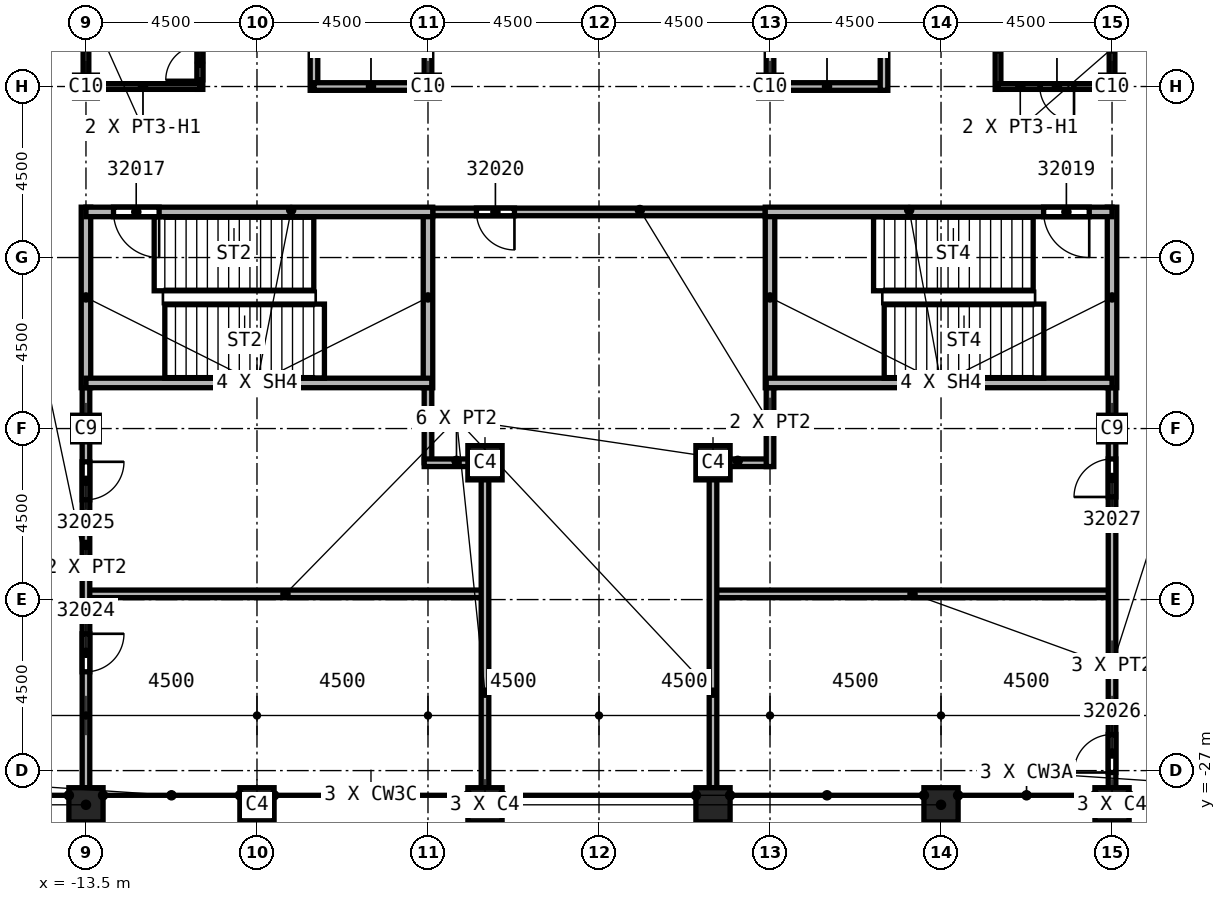
"""IFC4 building model, lengths in metres.
Left out: names, types, materials, properties, quantities, classifications, styles, units other than length and angle.
Written with IfcOpenShell. Run it as: python <this file> out.ifc"""

import sys

from ifc_helpers import new_model, si_unit, direction, frame, frame_2d, origin, origin_2d, place, context, subcontext, project, spatial, rectangle, extrude, element, fill, save


model = new_model("IFC4")
c1 = context("Model", 3, precision=1e-05, world=origin(), true_north=direction((0.0, 1.0)))
c2 = subcontext(c1, "Body", "Model", "MODEL_VIEW")
j1 = project(units=[si_unit("LENGTHUNIT", "METRE"), si_unit("PLANEANGLEUNIT", "RADIAN")], contexts=[c1])
p1 = place(None, origin())
s1 = spatial("IfcSite", under=j1, at=p1, CompositionType="ELEMENT")
p2 = place(p1, origin())
s2 = spatial("IfcBuilding", under=s1, at=p2, CompositionType="ELEMENT")
p3 = place(p2, frame((0.0, 0.0, 356.0)))
s3 = spatial("IfcBuildingStorey", under=s2, at=p3, CompositionType="ELEMENT", Elevation=356.0)
for number, where, z_axis, x_axis in (
    (1, (13.5, -18.0, 0.0), (0.0, 0.0, 1.0), (1.0, 0.0, 0.0)),
    (2, (-13.5, -18.0, 0.0), (0.0, 0.0, 1.0), (1.0, 0.0, 0.0)),
):
    element("IfcColumn", number, at=place(p3, frame(where, z_axis=z_axis, x_axis=x_axis)), inside=s3, PredefinedType="COLUMN", context=c2, shape_type="SweptSolid", body=[
        extrude(rectangle(XDim=0.7, YDim=0.7, at=origin_2d()), origin(), (0.0, 0.0, 1.0), 4.6),
    ])
for number, where, z_axis, x_axis in (
    (3, (4.5, -9.0, 0.0), (0.0, 0.0, 1.0), (1.0, 0.0, 0.0)),
    (4, (13.5, -9.0, 0.0), (0.0, 0.0, 1.0), (1.0, 0.0, 0.0)),
    (5, (-4.5, -9.0, 0.0), (0.0, 0.0, 1.0), (1.0, 0.0, 0.0)),
    (6, (-13.5, -9.0, 0.0), (0.0, 0.0, 1.0), (1.0, 0.0, 0.0)),
):
    element("IfcColumn", number, at=place(p3, frame(where, z_axis=z_axis, x_axis=x_axis)), inside=s3, PredefinedType="COLUMN", context=c2, shape_type="SweptSolid", body=[
        extrude(rectangle(XDim=0.6, YDim=0.6, at=origin_2d()), origin(), (0.0, 0.0, 1.0), 4.6),
    ])
for number, where, z_axis, x_axis in (
    (7, (3.0, -27.9, 0.0), (0.0, 0.0, 1.0), (1.0, 0.0, 0.0)),
    (8, (9.0, -27.9, 0.0), (0.0, 0.0, 1.0), (1.0, 0.0, 0.0)),
    (9, (13.5, -27.9, 0.0), (0.0, 0.0, 1.0), (1.0, 0.0, 0.0)),
    (10, (-3.0, -27.9, 0.0), (0.0, 0.0, 1.0), (1.0, 0.0, 0.0)),
    (11, (-9.0, -27.9, 0.0), (0.0, 0.0, 1.0), (1.0, 0.0, 0.0)),
    (12, (-13.5, -27.9, 0.0), (0.0, 0.0, 1.0), (1.0, 0.0, 0.0)),
    (13, (3.0, -18.9, 0.0), (0.0, 0.0, 1.0), (1.0, 0.0, 0.0)),
    (14, (-3.0, -18.9, 0.0), (0.0, 0.0, 1.0), (1.0, 0.0, 0.0)),
):
    element("IfcColumn", number, at=place(p3, frame(where, z_axis=z_axis, x_axis=x_axis)), inside=s3, PredefinedType="COLUMN", context=c2, shape_type="SweptSolid", body=[
        extrude(rectangle(XDim=0.9, YDim=0.9, at=origin_2d()), origin(), (0.0, 0.0, 1.0), 4.6),
    ])
p4 = place(p3, frame((-13.5, -22.35, 0.0), z_axis=(0.0, 0.0, 1.0), x_axis=(1.0, 0.0, 0.0)))
e15 = element("IfcWall", 15, at=p4, inside=s3, PredefinedType="PARTITIONING", context=c2, shape_type="SweptSolid", body=[
    extrude(rectangle(XDim=10.5, YDim=0.2, at=frame_2d((5.25, 0.0))), origin(), (0.0, 0.0, 1.0), 4.15),
])
p5 = place(p3, frame((-13.5, -16.675, 0.0), z_axis=(0.0, 0.0, 1.0), x_axis=(0.0, -1.0, 0.0)))
e16 = element("IfcWall", 16, at=p5, inside=s3, PredefinedType="PARTITIONING", context=c2, shape_type="SweptSolid", body=[
    extrude(rectangle(XDim=10.775, YDim=0.2, at=frame_2d((5.387, 0.0))), origin(), (0.0, 0.0, 1.0), 4.15),
])
p6 = place(p5, frame((6.725, 0.0, 0.0)))
e17 = element("IfcOpeningElement", 17, at=p6, cuts=e16, PredefinedType="OPENING", context=c2, shape_type="SweptSolid", body=[
    extrude(rectangle(XDim=1.0, YDim=2.1, at=frame_2d((0.5, 1.05))), frame((0.0, 0.1, 0.0), z_axis=(0.0, -1.0, 0.0), x_axis=(1.0, 0.0, 0.0)), (0.0, 0.0, 1.0), 0.2),
])
p7 = place(p5, frame((2.2, 0.0, 0.0)))
e18 = element("IfcOpeningElement", 18, at=p7, cuts=e16, PredefinedType="OPENING", context=c2, shape_type="SweptSolid", body=[
    extrude(rectangle(XDim=1.0, YDim=2.1, at=frame_2d((0.5, 1.05))), frame((0.0, 0.1, 0.0), z_axis=(0.0, -1.0, 0.0), x_axis=(1.0, 0.0, 0.0)), (0.0, 0.0, 1.0), 0.2),
])
p8 = place(p3, frame((-4.5, -18.9, 0.0), z_axis=(0.0, 0.0, 1.0), x_axis=(0.0, 1.0, 0.0)))
e19 = element("IfcWall", 19, at=p8, inside=s3, PredefinedType="PARTITIONING", context=c2, shape_type="SweptSolid", body=[
    extrude(rectangle(XDim=2.1, YDim=0.2, at=frame_2d((1.05, 0.0))), origin(), (0.0, 0.0, 1.0), 4.15),
])
p9 = place(p3, frame((-3.0, -27.45, 0.0), z_axis=(0.0, 0.0, 1.0), x_axis=(0.0, 1.0, 0.0)))
e20 = element("IfcWall", 20, at=p9, inside=s3, PredefinedType="PARTITIONING", context=c2, shape_type="SweptSolid", body=[
    extrude(rectangle(XDim=8.65, YDim=0.2, at=frame_2d((4.325, 0.0))), origin(), (0.0, 0.0, 1.0), 4.15),
])
p10 = place(p3, frame((-3.0, -18.9, 0.0), z_axis=(0.0, 0.0, 1.0), x_axis=(-1.0, 0.0, 0.0)))
e21 = element("IfcWall", 21, at=p10, inside=s3, PredefinedType="PARTITIONING", context=c2, shape_type="SweptSolid", body=[
    extrude(rectangle(XDim=1.6, YDim=0.2, at=frame_2d((0.8, 0.0))), origin(), (0.0, 0.0, 1.0), 4.15),
])
p11 = place(p3, frame((3.0, -22.35, 0.0), z_axis=(0.0, 0.0, 1.0), x_axis=(1.0, 0.0, 0.0)))
e22 = element("IfcWall", 22, at=p11, inside=s3, PredefinedType="PARTITIONING", context=c2, shape_type="SweptSolid", body=[
    extrude(rectangle(XDim=10.5, YDim=0.2, at=frame_2d((5.25, 0.0))), origin(), (0.0, 0.0, 1.0), 4.15),
])
p12 = place(p3, frame((3.0, -18.9, 0.0), z_axis=(0.0, 0.0, 1.0), x_axis=(0.0, -1.0, 0.0)))
e23 = element("IfcWall", 23, at=p12, inside=s3, PredefinedType="PARTITIONING", context=c2, shape_type="SweptSolid", body=[
    extrude(rectangle(XDim=8.55, YDim=0.2, at=frame_2d((4.275, 0.0))), origin(), (0.0, 0.0, 1.0), 4.15),
])
p13 = place(p3, frame((4.5, -18.9, 0.0), z_axis=(0.0, 0.0, 1.0), x_axis=(-1.0, 0.0, 0.0)))
e24 = element("IfcWall", 24, at=p13, inside=s3, PredefinedType="PARTITIONING", context=c2, shape_type="SweptSolid", body=[
    extrude(rectangle(XDim=1.6, YDim=0.2, at=frame_2d((0.8, 0.0))), origin(), (0.0, 0.0, 1.0), 4.15),
])
p14 = place(p3, frame((4.5, -16.8, 0.0), z_axis=(0.0, 0.0, 1.0), x_axis=(0.0, -1.0, 0.0)))
e25 = element("IfcWall", 25, at=p14, inside=s3, PredefinedType="PARTITIONING", context=c2, shape_type="SweptSolid", body=[
    extrude(rectangle(XDim=2.2, YDim=0.2, at=frame_2d((1.1, 0.0))), origin(), (0.0, 0.0, 1.0), 4.15),
])
p15 = place(p3, frame((4.625, -12.3, 0.0), z_axis=(0.0, 0.0, 1.0), x_axis=(-1.0, 0.0, 0.0)))
e26 = element("IfcWall", 26, at=p15, inside=s3, PredefinedType="PARTITIONING", context=c2, shape_type="SweptSolid", body=[
    extrude(rectangle(XDim=9.25, YDim=0.2, at=frame_2d((4.625, 0.0))), origin(), (0.0, 0.0, 1.0), 4.15),
])
p16 = place(p15, frame((6.85, 0.0, 0.0)))
e27 = element("IfcOpeningElement", 27, at=p16, cuts=e26, PredefinedType="OPENING", context=c2, shape_type="SweptSolid", body=[
    extrude(rectangle(XDim=1.0, YDim=2.1, at=frame_2d((0.5, 1.05))), frame((0.0, 0.1, 0.0), z_axis=(0.0, -1.0, 0.0), x_axis=(1.0, 0.0, 0.0)), (0.0, 0.0, 1.0), 0.2),
])
p17 = place(p3, frame((13.5, -27.45, 0.0), z_axis=(0.0, 0.0, 1.0), x_axis=(0.0, 1.0, 0.0)))
e28 = element("IfcWall", 28, at=p17, inside=s3, PredefinedType="PARTITIONING", context=c2, shape_type="SweptSolid", body=[
    extrude(rectangle(XDim=10.775, YDim=0.2, at=frame_2d((5.387, 0.0))), origin(), (0.0, 0.0, 1.0), 4.15),
])
p18 = place(p17, frame((0.4, 0.0, 0.0)))
e29 = element("IfcOpeningElement", 29, at=p18, cuts=e28, PredefinedType="OPENING", context=c2, shape_type="SweptSolid", body=[
    extrude(rectangle(XDim=1.0, YDim=2.1, at=frame_2d((0.5, 1.05))), frame((0.0, 0.1, 0.0), z_axis=(0.0, -1.0, 0.0), x_axis=(1.0, 0.0, 0.0)), (0.0, 0.0, 1.0), 0.2),
])
p19 = place(p17, frame((7.65, 0.0, 0.0)))
e30 = element("IfcOpeningElement", 30, at=p19, cuts=e28, PredefinedType="OPENING", context=c2, shape_type="SweptSolid", body=[
    extrude(rectangle(XDim=1.0, YDim=2.1, at=frame_2d((0.5, 1.05))), frame((0.0, 0.1, 0.0), z_axis=(0.0, -1.0, 0.0), x_axis=(1.0, 0.0, 0.0)), (0.0, 0.0, 1.0), 0.2),
])
p20 = place(p3, frame((-7.5, -9.1, 0.0), z_axis=(0.0, 0.0, 1.0), x_axis=(0.0, 1.0, 0.0)))
e31 = element("IfcWall", 31, at=p20, inside=s3, PredefinedType="SOLIDWALL", context=c2, shape_type="SweptSolid", body=[
    extrude(rectangle(XDim=6.225, YDim=0.2, at=frame_2d((3.113, 0.0))), origin(), (0.0, 0.0, 1.0), 4.15),
])
p21 = place(p3, frame((-4.5, -9.0, 0.0), z_axis=(0.0, 0.0, 1.0), x_axis=(-1.0, 0.0, 0.0)))
e32 = element("IfcWall", 32, at=p21, inside=s3, PredefinedType="SOLIDWALL", context=c2, shape_type="SweptSolid", body=[
    extrude(rectangle(XDim=3.0, YDim=0.2, at=frame_2d((1.5, 0.0))), origin(), (0.0, 0.0, 1.0), 3.838),
])
p22 = place(p3, frame((-4.5, 9.1, 0.0), z_axis=(0.0, 0.0, 1.0), x_axis=(0.0, -1.0, 0.0)))
e33 = element("IfcWall", 33, at=p22, inside=s3, PredefinedType="SOLIDWALL", context=c2, shape_type="SweptSolid", body=[
    extrude(rectangle(XDim=18.2, YDim=0.2, at=frame_2d((9.1, 0.0))), origin(), (0.0, 0.0, 1.0), 3.838),
])
p23 = place(p22, frame((12.35, 0.0, 0.0)))
e34 = element("IfcOpeningElement", 34, at=p23, cuts=e33, PredefinedType="OPENING", context=c2, shape_type="SweptSolid", body=[
    extrude(rectangle(XDim=1.1, YDim=2.1, at=frame_2d((0.55, 1.05))), frame((0.0, 0.1, 0.0), z_axis=(0.0, -1.0, 0.0), x_axis=(1.0, 0.0, 0.0)), (0.0, 0.0, 1.0), 0.2),
])
p24 = place(p22, frame((7.15, 0.0, 0.0)))
e35 = element("IfcOpeningElement", 35, at=p24, cuts=e33, PredefinedType="OPENING", context=c2, shape_type="SweptSolid", body=[
    extrude(rectangle(XDim=1.1, YDim=2.1, at=frame_2d((0.55, 1.05))), frame((0.0, 0.1, 0.0), z_axis=(0.0, -1.0, 0.0), x_axis=(1.0, 0.0, 0.0)), (0.0, 0.0, 1.0), 0.2),
])
p25 = place(p3, frame((4.5, -9.1, 0.0), z_axis=(0.0, 0.0, 1.0), x_axis=(0.0, 1.0, 0.0)))
e36 = element("IfcWall", 36, at=p25, inside=s3, PredefinedType="SOLIDWALL", context=c2, shape_type="SweptSolid", body=[
    extrude(rectangle(XDim=18.2, YDim=0.2, at=frame_2d((9.1, 0.0))), origin(), (0.0, 0.0, 1.0), 3.838),
])
p26 = place(p25, frame((2.5, 0.0, 0.0)))
e37 = element("IfcOpeningElement", 37, at=p26, cuts=e36, PredefinedType="OPENING", context=c2, shape_type="SweptSolid", body=[
    extrude(rectangle(XDim=1.1, YDim=2.1, at=frame_2d((0.55, 1.05))), frame((0.0, 0.1, 0.0), z_axis=(0.0, -1.0, 0.0), x_axis=(1.0, 0.0, 0.0)), (0.0, 0.0, 1.0), 0.2),
])
p27 = place(p25, frame((10.7, 0.0, 0.0)))
e38 = element("IfcOpeningElement", 38, at=p27, cuts=e36, PredefinedType="OPENING", context=c2, shape_type="SweptSolid", body=[
    extrude(rectangle(XDim=1.1, YDim=2.1, at=frame_2d((0.55, 1.05))), frame((0.0, 0.1, 0.0), z_axis=(0.0, -1.0, 0.0), x_axis=(1.0, 0.0, 0.0)), (0.0, 0.0, 1.0), 0.2),
])
p28 = place(p3, frame((7.5, -9.0, 0.0), z_axis=(0.0, 0.0, 1.0), x_axis=(-1.0, 0.0, 0.0)))
e39 = element("IfcWall", 39, at=p28, inside=s3, PredefinedType="SOLIDWALL", context=c2, shape_type="SweptSolid", body=[
    extrude(rectangle(XDim=3.0, YDim=0.2, at=frame_2d((1.5, 0.0))), origin(), (0.0, 0.0, 1.0), 3.838),
])
p29 = place(p3, frame((7.5, -2.875, 0.0), z_axis=(0.0, 0.0, 1.0), x_axis=(0.0, -1.0, 0.0)))
e40 = element("IfcWall", 40, at=p29, inside=s3, PredefinedType="SOLIDWALL", context=c2, shape_type="SweptSolid", body=[
    extrude(rectangle(XDim=6.225, YDim=0.2, at=frame_2d((3.113, 0.0))), origin(), (0.0, 0.0, 1.0), 4.15),
])
p30 = place(p3, frame((-13.5, -12.175, 0.0), z_axis=(0.0, 0.0, 1.0), x_axis=(0.0, -1.0, 0.0)))
e41 = element("IfcWall", 41, at=p30, inside=s3, PredefinedType="SOLIDWALL", context=c2, shape_type="SweptSolid", body=[
    extrude(rectangle(XDim=4.75, YDim=0.25, at=frame_2d((2.375, 0.0))), origin(), (0.0, 0.0, 1.0), 4.15),
])
p31 = place(p3, frame((-4.5, -12.3, 0.0), z_axis=(0.0, 0.0, 1.0), x_axis=(0.0, -1.0, 0.0)))
e42 = element("IfcWall", 42, at=p31, inside=s3, PredefinedType="SOLIDWALL", context=c2, shape_type="SweptSolid", body=[
    extrude(rectangle(XDim=4.625, YDim=0.25, at=frame_2d((2.312, 0.0))), origin(), (0.0, 0.0, 1.0), 4.15),
])
p32 = place(p3, frame((-4.4, -16.8, 0.0), z_axis=(0.0, 0.0, 1.0), x_axis=(-1.0, 0.0, 0.0)))
e43 = element("IfcWall", 43, at=p32, inside=s3, PredefinedType="SOLIDWALL", context=c2, shape_type="SweptSolid", body=[
    extrude(rectangle(XDim=9.1, YDim=0.25, at=frame_2d((4.55, 0.0))), origin(), (0.0, 0.0, 1.0), 4.15),
])
p33 = place(p3, frame((-4.375, -12.3, 0.0), z_axis=(0.0, 0.0, 1.0), x_axis=(-1.0, 0.0, 0.0)))
e44 = element("IfcWall", 44, at=p33, inside=s3, PredefinedType="SOLIDWALL", context=c2, shape_type="SweptSolid", body=[
    extrude(rectangle(XDim=9.125, YDim=0.25, at=frame_2d((4.562, 0.0))), origin(), (0.0, 0.0, 1.0), 4.15),
])
p34 = place(p33, frame((7.2, 0.0, 0.0)))
e45 = element("IfcOpeningElement", 45, at=p34, cuts=e44, PredefinedType="OPENING", context=c2, shape_type="SweptSolid", body=[
    extrude(rectangle(XDim=1.2, YDim=2.1, at=frame_2d((0.6, 1.05))), frame((0.0, 0.125, 0.0), z_axis=(0.0, -1.0, 0.0), x_axis=(1.0, 0.0, 0.0)), (0.0, 0.0, 1.0), 0.25),
])
p35 = place(p3, frame((4.5, -16.925, 0.0), z_axis=(0.0, 0.0, 1.0), x_axis=(0.0, 1.0, 0.0)))
e46 = element("IfcWall", 46, at=p35, inside=s3, PredefinedType="SOLIDWALL", context=c2, shape_type="SweptSolid", body=[
    extrude(rectangle(XDim=4.625, YDim=0.25, at=frame_2d((2.312, 0.0))), origin(), (0.0, 0.0, 1.0), 4.15),
])
p36 = place(p3, frame((13.5, -16.925, 0.0), z_axis=(0.0, 0.0, 1.0), x_axis=(0.0, 1.0, 0.0)))
e47 = element("IfcWall", 47, at=p36, inside=s3, PredefinedType="SOLIDWALL", context=c2, shape_type="SweptSolid", body=[
    extrude(rectangle(XDim=4.75, YDim=0.25, at=frame_2d((2.375, 0.0))), origin(), (0.0, 0.0, 1.0), 4.15),
])
p37 = place(p3, frame((13.5, -16.8, 0.0), z_axis=(0.0, 0.0, 1.0), x_axis=(-1.0, 0.0, 0.0)))
e48 = element("IfcWall", 48, at=p37, inside=s3, PredefinedType="SOLIDWALL", context=c2, shape_type="SweptSolid", body=[
    extrude(rectangle(XDim=9.1, YDim=0.25, at=frame_2d((4.55, 0.0))), origin(), (0.0, 0.0, 1.0), 4.15),
])
p38 = place(p3, frame((13.5, -12.3, 0.0), z_axis=(0.0, 0.0, 1.0), x_axis=(-1.0, 0.0, 0.0)))
e49 = element("IfcWall", 49, at=p38, inside=s3, PredefinedType="SOLIDWALL", context=c2, shape_type="SweptSolid", body=[
    extrude(rectangle(XDim=9.125, YDim=0.25, at=frame_2d((4.562, 0.0))), origin(), (0.0, 0.0, 1.0), 4.15),
])
p39 = place(p38, frame((0.6, 0.0, 0.0)))
e50 = element("IfcOpeningElement", 50, at=p39, cuts=e49, PredefinedType="OPENING", context=c2, shape_type="SweptSolid", body=[
    extrude(rectangle(XDim=1.2, YDim=2.1, at=frame_2d((0.6, 1.05))), frame((0.0, 0.125, 0.0), z_axis=(0.0, -1.0, 0.0), x_axis=(1.0, 0.0, 0.0)), (0.0, 0.0, 1.0), 0.25),
])
p40 = place(p3, frame((-13.5, -9.075, 0.0), z_axis=(0.0, 0.0, 1.0), x_axis=(0.0, 1.0, 0.0)))
e51 = element("IfcWall", 51, at=p40, inside=s3, PredefinedType="PARTITIONING", context=c2, shape_type="SweptSolid", body=[
    extrude(rectangle(XDim=4.575, YDim=0.15, at=frame_2d((2.288, 0.0))), origin(), (0.0, 0.0, 1.0), 3.838),
])
p41 = place(p3, frame((-10.5, -9.075, 0.0), z_axis=(0.0, 0.0, 1.0), x_axis=(0.0, 1.0, 0.0)))
e52 = element("IfcWall", 52, at=p41, inside=s3, PredefinedType="PARTITIONING", context=c2, shape_type="SweptSolid", body=[
    extrude(rectangle(XDim=4.65, YDim=0.15, at=frame_2d((2.325, 0.0))), origin(), (0.0, 0.0, 1.0), 4.15),
])
p42 = place(p41, frame((0.25, 0.0, 0.0)))
e53 = element("IfcOpeningElement", 53, at=p42, cuts=e52, PredefinedType="OPENING", context=c2, shape_type="SweptSolid", body=[
    extrude(rectangle(XDim=0.9, YDim=2.1, at=frame_2d((0.45, 1.05))), frame((0.0, 0.075, 0.0), z_axis=(0.0, -1.0, 0.0), x_axis=(1.0, 0.0, 0.0)), (0.0, 0.0, 1.0), 0.15),
])
p43 = place(p3, frame((-10.5, -9.0, 0.0), z_axis=(0.0, 0.0, 1.0), x_axis=(-1.0, 0.0, 0.0)))
e54 = element("IfcWall", 54, at=p43, inside=s3, PredefinedType="PARTITIONING", context=c2, shape_type="SweptSolid", body=[
    extrude(rectangle(XDim=3.0, YDim=0.15, at=frame_2d((1.5, 0.0))), origin(), (0.0, 0.0, 1.0), 3.838),
])
p44 = place(p3, frame((10.5, -6.925, 0.0), z_axis=(0.0, 0.0, 1.0), x_axis=(0.0, -1.0, 0.0)))
e55 = element("IfcWall", 55, at=p44, inside=s3, PredefinedType="PARTITIONING", context=c2, shape_type="SweptSolid", body=[
    extrude(rectangle(XDim=2.15, YDim=0.15, at=frame_2d((1.075, 0.0))), origin(), (0.0, 0.0, 1.0), 4.15),
])
p45 = place(p3, frame((13.5, -9.0, 0.0), z_axis=(0.0, 0.0, 1.0), x_axis=(-1.0, 0.0, 0.0)))
e56 = element("IfcWall", 56, at=p45, inside=s3, PredefinedType="PARTITIONING", context=c2, shape_type="SweptSolid", body=[
    extrude(rectangle(XDim=3.0, YDim=0.15, at=frame_2d((1.5, 0.0))), origin(), (0.0, 0.0, 1.0), 3.838),
])
p46 = place(p45, frame((1.0, 0.0, 0.0)))
e57 = element("IfcOpeningElement", 57, at=p46, cuts=e56, PredefinedType="OPENING", context=c2, shape_type="SweptSolid", body=[
    extrude(rectangle(XDim=0.9, YDim=2.1, at=frame_2d((0.45, 1.05))), frame((0.0, 0.075, 0.0), z_axis=(0.0, -1.0, 0.0), x_axis=(1.0, 0.0, 0.0)), (0.0, 0.0, 1.0), 0.15),
])
p47 = place(p3, frame((13.5, -7.0, 0.0), z_axis=(0.0, 0.0, 1.0), x_axis=(0.0, -1.0, 0.0)))
e58 = element("IfcWall", 58, at=p47, inside=s3, PredefinedType="PARTITIONING", context=c2, shape_type="SweptSolid", body=[
    extrude(rectangle(XDim=2.075, YDim=0.15, at=frame_2d((1.038, 0.0))), origin(), (0.0, 0.0, 1.0), 3.838),
])
p48 = place(p42, origin())
e59 = element("IfcDoor", 59, at=p48, inside=s3, OperationType="SINGLE_SWING_RIGHT", PredefinedType="DOOR", context=c2, shape_type="SweptSolid", body=[
    extrude(rectangle(XDim=0.9, YDim=2.1, at=frame_2d((0.45, 1.05))), frame((0.0, 0.025, 0.0), z_axis=(0.0, -1.0, 0.0), x_axis=(1.0, 0.0, 0.0)), (0.0, 0.0, 1.0), 0.05),
])
fill(e53, e59)
p49 = place(p46, origin())
e60 = element("IfcDoor", 60, at=p49, inside=s3, OperationType="SINGLE_SWING_RIGHT", PredefinedType="DOOR", context=c2, shape_type="SweptSolid", body=[
    extrude(rectangle(XDim=0.9, YDim=2.1, at=frame_2d((0.45, 1.05))), frame((0.0, 0.025, 0.0), z_axis=(0.0, -1.0, 0.0), x_axis=(1.0, 0.0, 0.0)), (0.0, 0.0, 1.0), 0.05),
])
fill(e57, e60)
p50 = place(p34, origin())
e61 = element("IfcDoor", 61, at=p50, inside=s3, OperationType="SINGLE_SWING_RIGHT", PredefinedType="DOOR", context=c2, shape_type="SweptSolid", body=[
    extrude(rectangle(XDim=1.2, YDim=2.1, at=frame_2d((0.6, 1.05))), frame((0.0, 0.025, 0.0), z_axis=(0.0, -1.0, 0.0), x_axis=(1.0, 0.0, 0.0)), (0.0, 0.0, 1.0), 0.05),
])
fill(e45, e61)
p51 = place(p39, origin())
e62 = element("IfcDoor", 62, at=p51, inside=s3, OperationType="SINGLE_SWING_RIGHT", PredefinedType="DOOR", context=c2, shape_type="SweptSolid", body=[
    extrude(rectangle(XDim=1.2, YDim=2.1, at=frame_2d((0.6, 1.05))), frame((0.0, 0.025, 0.0), z_axis=(0.0, -1.0, 0.0), x_axis=(1.0, 0.0, 0.0)), (0.0, 0.0, 1.0), 0.05),
])
fill(e50, e62)
p52 = place(p16, origin())
e63 = element("IfcDoor", 63, at=p52, inside=s3, OperationType="SINGLE_SWING_LEFT", PredefinedType="DOOR", context=c2, shape_type="SweptSolid", body=[
    extrude(rectangle(XDim=1.0, YDim=2.1, at=frame_2d((0.5, 1.05))), frame((0.0, 0.025, 0.0), z_axis=(0.0, -1.0, 0.0), x_axis=(1.0, 0.0, 0.0)), (0.0, 0.0, 1.0), 0.05),
])
fill(e27, e63)
p53 = place(p6, origin())
e64 = element("IfcDoor", 64, at=p53, inside=s3, OperationType="SINGLE_SWING_LEFT", PredefinedType="DOOR", context=c2, shape_type="SweptSolid", body=[
    extrude(rectangle(XDim=1.0, YDim=2.1, at=frame_2d((0.5, 1.05))), frame((0.0, 0.025, 0.0), z_axis=(0.0, -1.0, 0.0), x_axis=(1.0, 0.0, 0.0)), (0.0, 0.0, 1.0), 0.05),
])
fill(e17, e64)
p54 = place(p7, origin())
e65 = element("IfcDoor", 65, at=p54, inside=s3, OperationType="SINGLE_SWING_RIGHT", PredefinedType="DOOR", context=c2, shape_type="SweptSolid", body=[
    extrude(rectangle(XDim=1.0, YDim=2.1, at=frame_2d((0.5, 1.05))), frame((0.0, 0.025, 0.0), z_axis=(0.0, -1.0, 0.0), x_axis=(1.0, 0.0, 0.0)), (0.0, 0.0, 1.0), 0.05),
])
fill(e18, e65)
p55 = place(p18, origin())
e66 = element("IfcDoor", 66, at=p55, inside=s3, OperationType="SINGLE_SWING_LEFT", PredefinedType="DOOR", context=c2, shape_type="SweptSolid", body=[
    extrude(rectangle(XDim=1.0, YDim=2.1, at=frame_2d((0.5, 1.05))), frame((0.0, 0.025, 0.0), z_axis=(0.0, -1.0, 0.0), x_axis=(1.0, 0.0, 0.0)), (0.0, 0.0, 1.0), 0.05),
])
fill(e29, e66)
p56 = place(p19, origin())
e67 = element("IfcDoor", 67, at=p56, inside=s3, OperationType="SINGLE_SWING_RIGHT", PredefinedType="DOOR", context=c2, shape_type="SweptSolid", body=[
    extrude(rectangle(XDim=1.0, YDim=2.1, at=frame_2d((0.5, 1.05))), frame((0.0, 0.025, 0.0), z_axis=(0.0, -1.0, 0.0), x_axis=(1.0, 0.0, 0.0)), (0.0, 0.0, 1.0), 0.05),
])
fill(e30, e67)
save(model, sys.argv[1])
